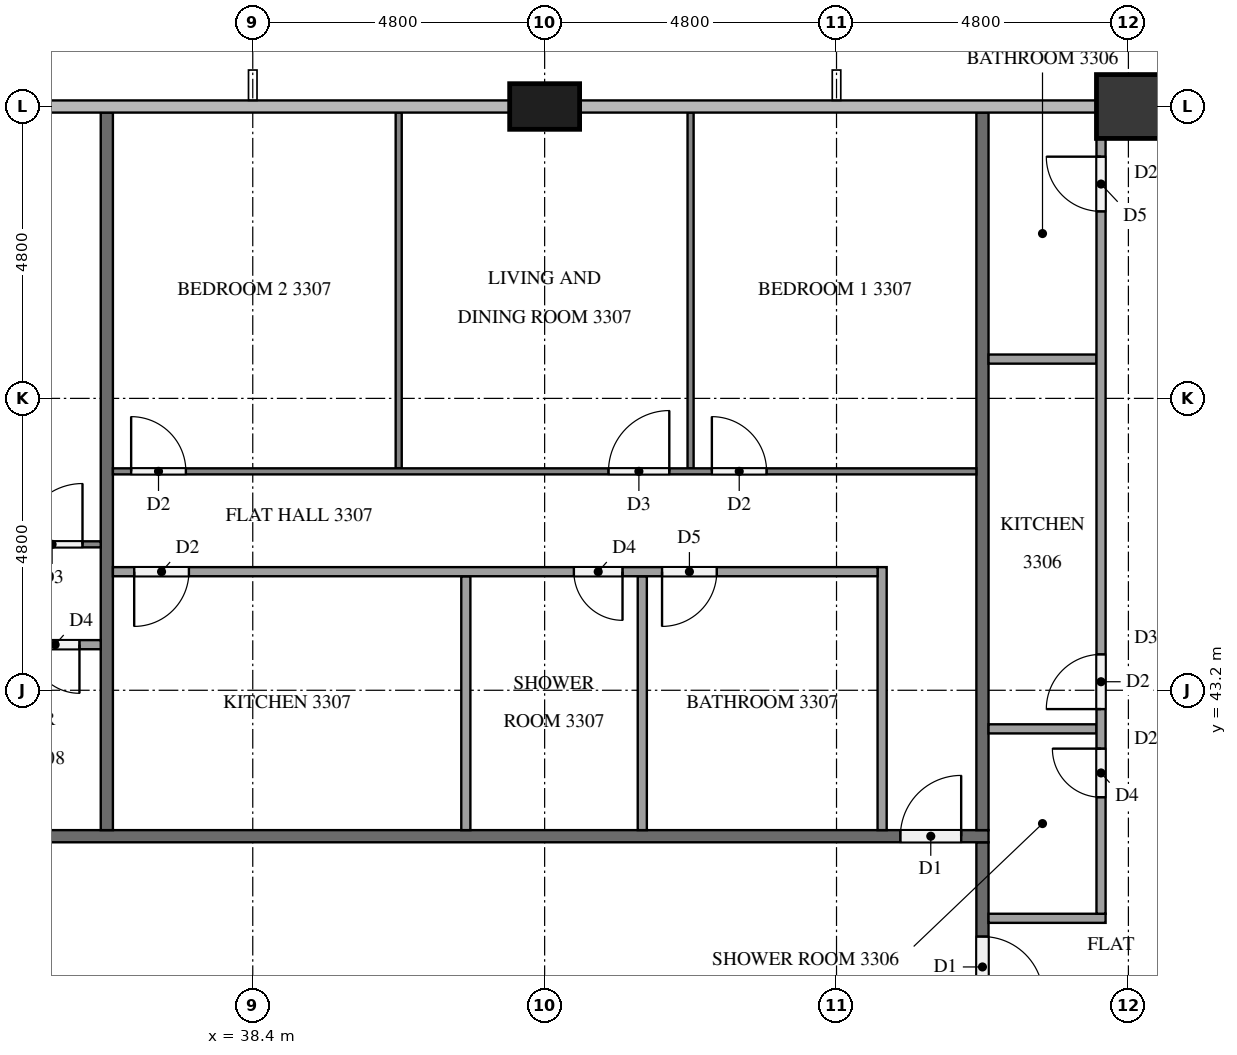
"""IFC4 building model, lengths in metres.
Left out: names, types, materials, properties, quantities, classifications, styles, units other than length and angle.
Written with IfcOpenShell. Run it as: python <this file> out.ifc"""

import sys

from ifc_helpers import new_model, si_unit, direction, frame, frame_2d, origin, origin_2d, place, context, subcontext, project, spatial, rectangle, extrude, element, fill, save


model = new_model("IFC4")
c1 = context("Model", 3, precision=1e-05, world=origin(), true_north=direction((0.0, 1.0)))
c2 = subcontext(c1, "Body", "Model", "MODEL_VIEW")
j1 = project(units=[si_unit("LENGTHUNIT", "METRE"), si_unit("PLANEANGLEUNIT", "RADIAN")], contexts=[c1])
p1 = place(None, origin())
s1 = spatial("IfcSite", under=j1, at=p1, CompositionType="ELEMENT")
p2 = place(p1, origin())
s2 = spatial("IfcBuilding", under=s1, at=p2, CompositionType="ELEMENT")
p3 = place(p2, frame((0.0, 0.0, 129.6)))
s3 = spatial("IfcBuildingStorey", under=s2, at=p3, CompositionType="ELEMENT", Elevation=129.6)
p4 = place(p3, frame((52.8, 52.8, 0.0), z_axis=(0.0, 0.0, 1.0), x_axis=(1.0, 0.0, 0.0)))
e1 = element("IfcColumn", 1, at=p4, inside=s3, PredefinedType="COLUMN", context=c2, shape_type="SweptSolid", body=[
    extrude(rectangle(XDim=1.05, YDim=1.05, at=origin_2d()), origin(), (0.0, 0.0, 1.0), 3.2),
])
p5 = place(p3, frame((43.2, 52.8, 0.0), z_axis=(0.0, 0.0, 1.0), x_axis=(1.0, 0.0, 0.0)))
e2 = element("IfcColumn", 2, at=p5, inside=s3, PredefinedType="COLUMN", context=c2, shape_type="SweptSolid", body=[
    extrude(rectangle(XDim=1.15, YDim=0.75, at=origin_2d()), origin(), (0.0, 0.0, 1.0), 3.2),
])
p6 = place(p3, frame((50.4, 40.7, 0.0), z_axis=(0.0, 0.0, 1.0), x_axis=(0.0, -1.0, 0.0)))
e3 = element("IfcWall", 3, at=p6, inside=s3, PredefinedType="PARTITIONING", context=c2, shape_type="SweptSolid", body=[
    extrude(rectangle(XDim=2.8, YDim=0.2, at=frame_2d((1.4, 0.0))), origin(), (0.0, 0.0, 1.0), 3.2),
])
p7 = place(p6, frame((1.55, 0.0, 0.0)))
e4 = element("IfcOpeningElement", 4, at=p7, cuts=e3, PredefinedType="OPENING", context=c2, shape_type="SweptSolid", body=[
    extrude(rectangle(XDim=1.0, YDim=2.1, at=frame_2d((0.5, 1.05))), frame((0.0, 0.11, 0.0), z_axis=(0.0, -1.0, 0.0), x_axis=(1.0, 0.0, 0.0)), (0.0, 0.0, 1.0), 0.22),
])
p8 = place(p3, frame((11.9, 40.8, 0.0), z_axis=(0.0, 0.0, 1.0), x_axis=(1.0, 0.0, 0.0)))
e5 = element("IfcWall", 5, at=p8, inside=s3, PredefinedType="PARTITIONING", context=c2, shape_type="SweptSolid", body=[
    extrude(rectangle(XDim=38.6, YDim=0.2, at=frame_2d((19.3, 0.0))), origin(), (0.0, 0.0, 1.0), 3.2),
])
p9 = place(p8, frame((37.15, 0.0, 0.0)))
e6 = element("IfcOpeningElement", 6, at=p9, cuts=e5, PredefinedType="OPENING", context=c2, shape_type="SweptSolid", body=[
    extrude(rectangle(XDim=1.0, YDim=2.1, at=frame_2d((0.5, 1.05))), frame((0.0, 0.11, 0.0), z_axis=(0.0, -1.0, 0.0), x_axis=(1.0, 0.0, 0.0)), (0.0, 0.0, 1.0), 0.22),
])
p10 = place(p8, frame((10.05, 0.0, 0.0)))
e7 = element("IfcOpeningElement", 7, at=p10, cuts=e5, PredefinedType="OPENING", context=c2, shape_type="SweptSolid", body=[
    extrude(rectangle(XDim=1.0, YDim=2.1, at=frame_2d((0.5, 1.05))), frame((0.0, 0.11, 0.0), z_axis=(0.0, -1.0, 0.0), x_axis=(1.0, 0.0, 0.0)), (0.0, 0.0, 1.0), 0.22),
])
p11 = place(p8, frame((0.45, 0.0, 0.0)))
e8 = element("IfcOpeningElement", 8, at=p11, cuts=e5, PredefinedType="OPENING", context=c2, shape_type="SweptSolid", body=[
    extrude(rectangle(XDim=1.0, YDim=2.1, at=frame_2d((0.5, 1.05))), frame((0.0, 0.11, 0.0), z_axis=(0.0, -1.0, 0.0), x_axis=(1.0, 0.0, 0.0)), (0.0, 0.0, 1.0), 0.22),
])
for number, where, z_axis, x_axis in (
    (9, (50.4, 40.9, 0.0), (0.0, 0.0, 1.0), (0.0, 1.0, 0.0)),
    (10, (36.0, 52.7, 0.0), (0.0, 0.0, 1.0), (0.0, -1.0, 0.0)),
):
    element("IfcWall", number, at=place(p3, frame(where, z_axis=z_axis, x_axis=x_axis)), inside=s3, PredefinedType="PARTITIONING", context=c2, shape_type="SweptSolid", body=[
        extrude(rectangle(XDim=11.8, YDim=0.2, at=frame_2d((5.9, 0.0))), origin(), (0.0, 0.0, 1.0), 3.2),
    ])
for number, where, z_axis, x_axis in (
    (11, (50.5, 42.565, 0.0), (0.0, 0.0, 1.0), (1.0, 0.0, 0.0)),
    (12, (50.5, 48.646, 0.0), (0.0, 0.0, 1.0), (1.0, 0.0, 0.0)),
):
    element("IfcWall", number, at=place(p3, frame(where, z_axis=z_axis, x_axis=x_axis)), inside=s3, PredefinedType="PARTITIONING", context=c2, shape_type="SweptSolid", body=[
        extrude(rectangle(XDim=1.775, YDim=0.15, at=frame_2d((0.887, 0.0))), origin(), (0.0, 0.0, 1.0), 3.2),
    ])
p12 = place(p3, frame((50.5, 39.45, 0.0), z_axis=(0.0, 0.0, 1.0), x_axis=(1.0, 0.0, 0.0)))
e13 = element("IfcWall", 13, at=p12, inside=s3, PredefinedType="PARTITIONING", context=c2, shape_type="SweptSolid", body=[
    extrude(rectangle(XDim=1.925, YDim=0.15, at=frame_2d((0.962, 0.0))), origin(), (0.0, 0.0, 1.0), 3.2),
])
p13 = place(p3, frame((52.35, 39.525, 0.0), z_axis=(0.0, 0.0, 1.0), x_axis=(0.0, 1.0, 0.0)))
e14 = element("IfcWall", 14, at=p13, inside=s3, PredefinedType="PARTITIONING", context=c2, shape_type="SweptSolid", body=[
    extrude(rectangle(XDim=12.75, YDim=0.15, at=frame_2d((6.375, 0.0))), origin(), (0.0, 0.0, 1.0), 3.2),
])
p14 = place(p13, frame((1.915, 0.0, 0.0)))
e15 = element("IfcOpeningElement", 15, at=p14, cuts=e14, PredefinedType="OPENING", context=c2, shape_type="SweptSolid", body=[
    extrude(rectangle(XDim=0.8, YDim=2.1, at=frame_2d((0.4, 1.05))), frame((0.0, 0.085, 0.0), z_axis=(0.0, -1.0, 0.0), x_axis=(1.0, 0.0, 0.0)), (0.0, 0.0, 1.0), 0.17),
])
p15 = place(p13, frame((3.365, 0.0, 0.0)))
e16 = element("IfcOpeningElement", 16, at=p15, cuts=e14, PredefinedType="OPENING", context=c2, shape_type="SweptSolid", body=[
    extrude(rectangle(XDim=0.9, YDim=2.1, at=frame_2d((0.45, 1.05))), frame((0.0, 0.085, 0.0), z_axis=(0.0, -1.0, 0.0), x_axis=(1.0, 0.0, 0.0)), (0.0, 0.0, 1.0), 0.17),
])
p16 = place(p13, frame((11.55, 0.0, 0.0)))
e17 = element("IfcOpeningElement", 17, at=p16, cuts=e14, PredefinedType="OPENING", context=c2, shape_type="SweptSolid", body=[
    extrude(rectangle(XDim=0.9, YDim=2.1, at=frame_2d((0.45, 1.05))), frame((0.0, 0.085, 0.0), z_axis=(0.0, -1.0, 0.0), x_axis=(1.0, 0.0, 0.0)), (0.0, 0.0, 1.0), 0.17),
])
for number, where, z_axis, x_axis in (
    (18, (45.6, 46.85, 0.0), (0.0, 0.0, 1.0), (0.0, 1.0, 0.0)),
    (19, (40.8, 46.85, 0.0), (0.0, 0.0, 1.0), (0.0, 1.0, 0.0)),
):
    element("IfcWall", number, at=place(p3, frame(where, z_axis=z_axis, x_axis=x_axis)), inside=s3, PredefinedType="PARTITIONING", context=c2, shape_type="SweptSolid", body=[
        extrude(rectangle(XDim=5.85, YDim=0.1, at=frame_2d((2.925, 0.0))), origin(), (0.0, 0.0, 1.0), 3.2),
    ])
p17 = place(p3, frame((36.1, 46.8, 0.0), z_axis=(0.0, 0.0, 1.0), x_axis=(1.0, 0.0, 0.0)))
e20 = element("IfcWall", 20, at=p17, inside=s3, PredefinedType="PARTITIONING", context=c2, shape_type="SweptSolid", body=[
    extrude(rectangle(XDim=14.2, YDim=0.1, at=frame_2d((7.1, 0.0))), origin(), (0.0, 0.0, 1.0), 3.2),
])
p18 = place(p17, frame((9.85, 0.0, 0.0)))
e21 = element("IfcOpeningElement", 21, at=p18, cuts=e20, PredefinedType="OPENING", context=c2, shape_type="SweptSolid", body=[
    extrude(rectangle(XDim=0.9, YDim=2.1, at=frame_2d((0.45, 1.05))), frame((0.0, 0.06, 0.0), z_axis=(0.0, -1.0, 0.0), x_axis=(1.0, 0.0, 0.0)), (0.0, 0.0, 1.0), 0.12),
])
p19 = place(p17, frame((8.15, 0.0, 0.0)))
e22 = element("IfcOpeningElement", 22, at=p19, cuts=e20, PredefinedType="OPENING", context=c2, shape_type="SweptSolid", body=[
    extrude(rectangle(XDim=1.0, YDim=2.1, at=frame_2d((0.5, 1.05))), frame((0.0, 0.06, 0.0), z_axis=(0.0, -1.0, 0.0), x_axis=(1.0, 0.0, 0.0)), (0.0, 0.0, 1.0), 0.12),
])
p20 = place(p17, frame((0.3, 0.0, 0.0)))
e23 = element("IfcOpeningElement", 23, at=p20, cuts=e20, PredefinedType="OPENING", context=c2, shape_type="SweptSolid", body=[
    extrude(rectangle(XDim=0.9, YDim=2.1, at=frame_2d((0.45, 1.05))), frame((0.0, 0.06, 0.0), z_axis=(0.0, -1.0, 0.0), x_axis=(1.0, 0.0, 0.0)), (0.0, 0.0, 1.0), 0.12),
])
for number, where, z_axis, x_axis in (
    (24, (44.806, 40.9, 0.0), (0.0, 0.0, 1.0), (0.0, 1.0, 0.0)),
    (25, (41.904, 40.9, 0.0), (0.0, 0.0, 1.0), (0.0, 1.0, 0.0)),
):
    element("IfcWall", number, at=place(p3, frame(where, z_axis=z_axis, x_axis=x_axis)), inside=s3, PredefinedType="PARTITIONING", context=c2, shape_type="SweptSolid", body=[
        extrude(rectangle(XDim=4.175, YDim=0.15, at=frame_2d((2.087, 0.0))), origin(), (0.0, 0.0, 1.0), 3.2),
    ])
p21 = place(p3, frame((48.75, 40.9, 0.0), z_axis=(0.0, 0.0, 1.0), x_axis=(0.0, 1.0, 0.0)))
e26 = element("IfcWall", 26, at=p21, inside=s3, PredefinedType="PARTITIONING", context=c2, shape_type="SweptSolid", body=[
    extrude(rectangle(XDim=4.325, YDim=0.15, at=frame_2d((2.163, 0.0))), origin(), (0.0, 0.0, 1.0), 3.2),
])
p22 = place(p3, frame((48.675, 45.15, 0.0), z_axis=(0.0, 0.0, 1.0), x_axis=(-1.0, 0.0, 0.0)))
e27 = element("IfcWall", 27, at=p22, inside=s3, PredefinedType="PARTITIONING", context=c2, shape_type="SweptSolid", body=[
    extrude(rectangle(XDim=12.575, YDim=0.15, at=frame_2d((6.288, 0.0))), origin(), (0.0, 0.0, 1.0), 3.2),
])
p23 = place(p22, frame((2.644, 0.0, 0.0)))
e28 = element("IfcOpeningElement", 28, at=p23, cuts=e27, PredefinedType="OPENING", context=c2, shape_type="SweptSolid", body=[
    extrude(rectangle(XDim=0.9, YDim=2.1, at=frame_2d((0.45, 1.05))), frame((0.0, 0.085, 0.0), z_axis=(0.0, -1.0, 0.0), x_axis=(1.0, 0.0, 0.0)), (0.0, 0.0, 1.0), 0.17),
])
p24 = place(p22, frame((4.194, 0.0, 0.0)))
e29 = element("IfcOpeningElement", 29, at=p24, cuts=e27, PredefinedType="OPENING", context=c2, shape_type="SweptSolid", body=[
    extrude(rectangle(XDim=0.8, YDim=2.1, at=frame_2d((0.4, 1.05))), frame((0.0, 0.085, 0.0), z_axis=(0.0, -1.0, 0.0), x_axis=(1.0, 0.0, 0.0)), (0.0, 0.0, 1.0), 0.17),
])
p25 = place(p22, frame((11.325, 0.0, 0.0)))
e30 = element("IfcOpeningElement", 30, at=p25, cuts=e27, PredefinedType="OPENING", context=c2, shape_type="SweptSolid", body=[
    extrude(rectangle(XDim=0.9, YDim=2.1, at=frame_2d((0.45, 1.05))), frame((0.0, 0.085, 0.0), z_axis=(0.0, -1.0, 0.0), x_axis=(1.0, 0.0, 0.0)), (0.0, 0.0, 1.0), 0.17),
])
p26 = place(p3, frame((21.7, 45.6, 0.0), z_axis=(0.0, 0.0, 1.0), x_axis=(1.0, 0.0, 0.0)))
e31 = element("IfcWall", 31, at=p26, inside=s3, PredefinedType="PARTITIONING", context=c2, shape_type="SweptSolid", body=[
    extrude(rectangle(XDim=14.2, YDim=0.1, at=frame_2d((7.1, 0.0))), origin(), (0.0, 0.0, 1.0), 3.2),
])
p27 = place(p26, frame((3.45, 0.0, 0.0)))
e32 = element("IfcOpeningElement", 32, at=p27, cuts=e31, PredefinedType="OPENING", context=c2, shape_type="SweptSolid", body=[
    extrude(rectangle(XDim=0.9, YDim=2.1, at=frame_2d((0.45, 1.05))), frame((0.0, 0.06, 0.0), z_axis=(0.0, -1.0, 0.0), x_axis=(1.0, 0.0, 0.0)), (0.0, 0.0, 1.0), 0.12),
])
p28 = place(p26, frame((5.05, 0.0, 0.0)))
e33 = element("IfcOpeningElement", 33, at=p28, cuts=e31, PredefinedType="OPENING", context=c2, shape_type="SweptSolid", body=[
    extrude(rectangle(XDim=0.9, YDim=2.1, at=frame_2d((0.45, 1.05))), frame((0.0, 0.06, 0.0), z_axis=(0.0, -1.0, 0.0), x_axis=(1.0, 0.0, 0.0)), (0.0, 0.0, 1.0), 0.12),
])
p29 = place(p26, frame((12.9, 0.0, 0.0)))
e34 = element("IfcOpeningElement", 34, at=p29, cuts=e31, PredefinedType="OPENING", context=c2, shape_type="SweptSolid", body=[
    extrude(rectangle(XDim=1.0, YDim=2.1, at=frame_2d((0.5, 1.05))), frame((0.0, 0.06, 0.0), z_axis=(0.0, -1.0, 0.0), x_axis=(1.0, 0.0, 0.0)), (0.0, 0.0, 1.0), 0.12),
])
p30 = place(p3, frame((35.9, 43.95, 0.0), z_axis=(0.0, 0.0, 1.0), x_axis=(-1.0, 0.0, 0.0)))
e35 = element("IfcWall", 35, at=p30, inside=s3, PredefinedType="PARTITIONING", context=c2, shape_type="SweptSolid", body=[
    extrude(rectangle(XDim=12.575, YDim=0.15, at=frame_2d((6.288, 0.0))), origin(), (0.0, 0.0, 1.0), 3.2),
])
p31 = place(p30, frame((7.096, 0.0, 0.0)))
e36 = element("IfcOpeningElement", 36, at=p31, cuts=e35, PredefinedType="OPENING", context=c2, shape_type="SweptSolid", body=[
    extrude(rectangle(XDim=0.9, YDim=2.1, at=frame_2d((0.45, 1.05))), frame((0.0, 0.085, 0.0), z_axis=(0.0, -1.0, 0.0), x_axis=(1.0, 0.0, 0.0)), (0.0, 0.0, 1.0), 0.17),
])
p32 = place(p30, frame((5.546, 0.0, 0.0)))
e37 = element("IfcOpeningElement", 37, at=p32, cuts=e35, PredefinedType="OPENING", context=c2, shape_type="SweptSolid", body=[
    extrude(rectangle(XDim=0.9, YDim=2.1, at=frame_2d((0.45, 1.05))), frame((0.0, 0.085, 0.0), z_axis=(0.0, -1.0, 0.0), x_axis=(1.0, 0.0, 0.0)), (0.0, 0.0, 1.0), 0.17),
])
p33 = place(p30, frame((0.35, 0.0, 0.0)))
e38 = element("IfcOpeningElement", 38, at=p33, cuts=e35, PredefinedType="OPENING", context=c2, shape_type="SweptSolid", body=[
    extrude(rectangle(XDim=0.8, YDim=2.1, at=frame_2d((0.4, 1.05))), frame((0.0, 0.085, 0.0), z_axis=(0.0, -1.0, 0.0), x_axis=(1.0, 0.0, 0.0)), (0.0, 0.0, 1.0), 0.17),
])
p34 = place(p7, origin())
e39 = element("IfcDoor", 39, at=p34, inside=s3, OperationType="SINGLE_SWING_RIGHT", PredefinedType="DOOR", context=c2, shape_type="SweptSolid", body=[
    extrude(rectangle(XDim=1.0, YDim=2.1, at=frame_2d((0.5, 1.05))), frame((0.0, 0.025, 0.0), z_axis=(0.0, -1.0, 0.0), x_axis=(1.0, 0.0, 0.0)), (0.0, 0.0, 1.0), 0.05),
])
fill(e4, e39)
p35 = place(p9, origin())
e40 = element("IfcDoor", 40, at=p35, inside=s3, OperationType="SINGLE_SWING_RIGHT", PredefinedType="DOOR", context=c2, shape_type="SweptSolid", body=[
    extrude(rectangle(XDim=1.0, YDim=2.1, at=frame_2d((0.5, 1.05))), frame((0.0, 0.025, 0.0), z_axis=(0.0, -1.0, 0.0), x_axis=(1.0, 0.0, 0.0)), (0.0, 0.0, 1.0), 0.05),
])
fill(e6, e40)
p36 = place(p14, origin())
e41 = element("IfcDoor", 41, at=p36, inside=s3, OperationType="SINGLE_SWING_RIGHT", PredefinedType="DOOR", context=c2, shape_type="SweptSolid", body=[
    extrude(rectangle(XDim=0.8, YDim=2.1, at=frame_2d((0.4, 1.05))), frame((0.0, 0.025, 0.0), z_axis=(0.0, -1.0, 0.0), x_axis=(1.0, 0.0, 0.0)), (0.0, 0.0, 1.0), 0.05),
])
fill(e15, e41)
p37 = place(p15, origin())
e42 = element("IfcDoor", 42, at=p37, inside=s3, OperationType="SINGLE_SWING_LEFT", PredefinedType="DOOR", context=c2, shape_type="SweptSolid", body=[
    extrude(rectangle(XDim=0.9, YDim=2.1, at=frame_2d((0.45, 1.05))), frame((0.0, 0.025, 0.0), z_axis=(0.0, -1.0, 0.0), x_axis=(1.0, 0.0, 0.0)), (0.0, 0.0, 1.0), 0.05),
])
fill(e16, e42)
p38 = place(p16, origin())
e43 = element("IfcDoor", 43, at=p38, inside=s3, OperationType="SINGLE_SWING_RIGHT", PredefinedType="DOOR", context=c2, shape_type="SweptSolid", body=[
    extrude(rectangle(XDim=0.9, YDim=2.1, at=frame_2d((0.45, 1.05))), frame((0.0, 0.025, 0.0), z_axis=(0.0, -1.0, 0.0), x_axis=(1.0, 0.0, 0.0)), (0.0, 0.0, 1.0), 0.05),
])
fill(e17, e43)
p39 = place(p18, origin())
e44 = element("IfcDoor", 44, at=p39, inside=s3, OperationType="SINGLE_SWING_LEFT", PredefinedType="DOOR", context=c2, shape_type="SweptSolid", body=[
    extrude(rectangle(XDim=0.9, YDim=2.1, at=frame_2d((0.45, 1.05))), frame((0.0, 0.025, 0.0), z_axis=(0.0, -1.0, 0.0), x_axis=(1.0, 0.0, 0.0)), (0.0, 0.0, 1.0), 0.05),
])
fill(e21, e44)
p40 = place(p19, origin())
e45 = element("IfcDoor", 45, at=p40, inside=s3, OperationType="SINGLE_SWING_RIGHT", PredefinedType="DOOR", context=c2, shape_type="SweptSolid", body=[
    extrude(rectangle(XDim=1.0, YDim=2.1, at=frame_2d((0.5, 1.05))), frame((0.0, 0.025, 0.0), z_axis=(0.0, -1.0, 0.0), x_axis=(1.0, 0.0, 0.0)), (0.0, 0.0, 1.0), 0.05),
])
fill(e22, e45)
p41 = place(p20, origin())
e46 = element("IfcDoor", 46, at=p41, inside=s3, OperationType="SINGLE_SWING_LEFT", PredefinedType="DOOR", context=c2, shape_type="SweptSolid", body=[
    extrude(rectangle(XDim=0.9, YDim=2.1, at=frame_2d((0.45, 1.05))), frame((0.0, 0.025, 0.0), z_axis=(0.0, -1.0, 0.0), x_axis=(1.0, 0.0, 0.0)), (0.0, 0.0, 1.0), 0.05),
])
fill(e23, e46)
p42 = place(p23, origin())
e47 = element("IfcDoor", 47, at=p42, inside=s3, OperationType="SINGLE_SWING_RIGHT", PredefinedType="DOOR", context=c2, shape_type="SweptSolid", body=[
    extrude(rectangle(XDim=0.9, YDim=2.1, at=frame_2d((0.45, 1.05))), frame((0.0, 0.025, 0.0), z_axis=(0.0, -1.0, 0.0), x_axis=(1.0, 0.0, 0.0)), (0.0, 0.0, 1.0), 0.05),
])
fill(e28, e47)
p43 = place(p24, origin())
e48 = element("IfcDoor", 48, at=p43, inside=s3, OperationType="SINGLE_SWING_LEFT", PredefinedType="DOOR", context=c2, shape_type="SweptSolid", body=[
    extrude(rectangle(XDim=0.8, YDim=2.1, at=frame_2d((0.4, 1.05))), frame((0.0, 0.025, 0.0), z_axis=(0.0, -1.0, 0.0), x_axis=(1.0, 0.0, 0.0)), (0.0, 0.0, 1.0), 0.05),
])
fill(e29, e48)
p44 = place(p25, origin())
e49 = element("IfcDoor", 49, at=p44, inside=s3, OperationType="SINGLE_SWING_RIGHT", PredefinedType="DOOR", context=c2, shape_type="SweptSolid", body=[
    extrude(rectangle(XDim=0.9, YDim=2.1, at=frame_2d((0.45, 1.05))), frame((0.0, 0.025, 0.0), z_axis=(0.0, -1.0, 0.0), x_axis=(1.0, 0.0, 0.0)), (0.0, 0.0, 1.0), 0.05),
])
fill(e30, e49)
p45 = place(p29, origin())
e50 = element("IfcDoor", 50, at=p45, inside=s3, OperationType="SINGLE_SWING_RIGHT", PredefinedType="DOOR", context=c2, shape_type="SweptSolid", body=[
    extrude(rectangle(XDim=1.0, YDim=2.1, at=frame_2d((0.5, 1.05))), frame((0.0, 0.025, 0.0), z_axis=(0.0, -1.0, 0.0), x_axis=(1.0, 0.0, 0.0)), (0.0, 0.0, 1.0), 0.05),
])
fill(e34, e50)
p46 = place(p33, origin())
e51 = element("IfcDoor", 51, at=p46, inside=s3, OperationType="SINGLE_SWING_LEFT", PredefinedType="DOOR", context=c2, shape_type="SweptSolid", body=[
    extrude(rectangle(XDim=0.8, YDim=2.1, at=frame_2d((0.4, 1.05))), frame((0.0, 0.025, 0.0), z_axis=(0.0, -1.0, 0.0), x_axis=(1.0, 0.0, 0.0)), (0.0, 0.0, 1.0), 0.05),
])
fill(e38, e51)
save(model, sys.argv[1])
